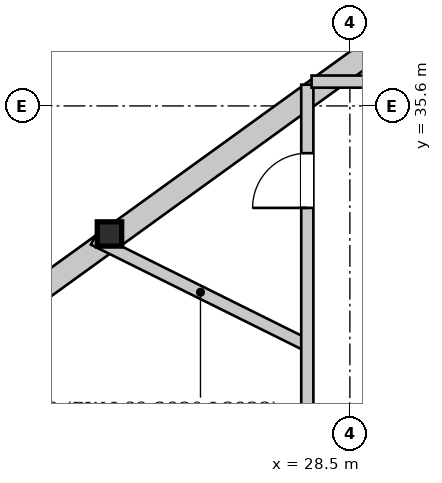
"""IFC4 building model, lengths in metres.
Left out: names, types, materials, properties, quantities, classifications, styles, units other than length and angle.
Written with IfcOpenShell. Run it as: python <this file> out.ifc"""

import sys

from ifc_helpers import new_model, si_unit, direction, frame, frame_2d, origin, origin_2d, place, context, subcontext, project, spatial, rectangle, i_section, extrude, source, transform, mapped, element, fill, save


model = new_model("IFC4")
c1 = context("Model", 3, precision=1e-05, world=origin(), true_north=direction((0.0, 1.0)))
c2 = subcontext(c1, "Body", "Model", "MODEL_VIEW")
j1 = project(units=[si_unit("LENGTHUNIT", "METRE"), si_unit("PLANEANGLEUNIT", "RADIAN")], contexts=[c1])
p1 = place(None, origin())
s1 = spatial("IfcSite", under=j1, at=p1, CompositionType="ELEMENT")
p2 = place(p1, origin())
s2 = spatial("IfcBuilding", under=s1, at=p2, CompositionType="ELEMENT")
p3 = place(p2, frame((0.0, 0.0, 259.7)))
s3 = spatial("IfcBuildingStorey", under=s2, at=p3, CompositionType="ELEMENT", Elevation=259.7)
m1 = source(origin(), c2, "Body", "SweptSolid", [
    extrude(i_section(OverallWidth=0.401, OverallDepth=0.399, WebThickness=0.022, FlangeThickness=0.034, at=origin_2d()), origin(), (0.0, 0.0, 1.0), 3.449),
])
p4 = place(p3, frame((24.567, 33.648, 0.0), z_axis=(-0.011892015434, -0.089048544142, 0.995956292593), x_axis=(0.991200353679, -0.13237015852, 0.0)))
e1 = element("IfcColumn", 1, at=p4, inside=s3, PredefinedType="COLUMN", context=c2, shape_type="MappedRepresentation", body=[
    mapped(m1, transform((0.0, 0.0, 0.0), x_axis=(1.0, 0.0, 0.0), y_axis=(0.0, 1.0, 0.0), z_axis=(0.0, 0.0, 1.0), scale=1.0)),
])
p5 = place(p3, frame((15.819, 27.087, 0.0), z_axis=(0.0, 0.0, 1.0), x_axis=(0.810286001924, 0.586034636421, 0.0)))
e2 = element("IfcWall", 2, at=p5, inside=s3, PredefinedType="SOLIDWALL", context=c2, shape_type="SweptSolid", body=[
    extrude(rectangle(XDim=21.866, YDim=0.38, at=frame_2d((10.933, 0.0))), origin(), (0.0, 0.0, 1.0), 2.872),
])
p6 = place(p5, frame((5.023, 0.0, 0.502)))
e3 = element("IfcOpeningElement", 3, at=p6, cuts=e2, PredefinedType="OPENING", context=c2, shape_type="SweptSolid", body=[
    extrude(rectangle(XDim=2.2, YDim=2.25, at=frame_2d((1.1, 1.125))), frame((0.0, 0.2, 0.0), z_axis=(0.0, -1.0, 0.0), x_axis=(1.0, 0.0, 0.0)), (0.0, 0.0, 1.0), 0.4),
])
p7 = place(p5, frame((16.244, 0.0, 0.502)))
e4 = element("IfcOpeningElement", 4, at=p7, cuts=e2, PredefinedType="OPENING", context=c2, shape_type="SweptSolid", body=[
    extrude(rectangle(XDim=2.2, YDim=2.25, at=frame_2d((1.1, 1.125))), frame((0.0, 0.2, 0.0), z_axis=(0.0, -1.0, 0.0), x_axis=(1.0, 0.0, 0.0)), (0.0, 0.0, 1.0), 0.4),
])
p8 = place(p3, frame((27.8, 31.663, 0.0), z_axis=(0.0, 0.0, 1.0), x_axis=(-0.895717798703, 0.444623014571, 0.0)))
e5 = element("IfcWall", 5, at=p8, inside=s3, PredefinedType="PARTITIONING", context=c2, shape_type="SweptSolid", body=[
    extrude(rectangle(XDim=3.923, YDim=0.2, at=frame_2d((1.962, 0.0))), origin(), (0.0, 0.0, 1.0), 3.38),
])
p9 = place(p3, frame((27.8, 17.2, 0.0), z_axis=(0.0, 0.0, 1.0), x_axis=(0.0, 1.0, 0.0)))
e6 = element("IfcWall", 6, at=p9, inside=s3, PredefinedType="PARTITIONING", context=c2, shape_type="SweptSolid", body=[
    extrude(rectangle(XDim=18.749, YDim=0.2, at=frame_2d((9.375, 0.0))), origin(), (0.0, 0.0, 1.0), 3.38),
])
p10 = place(p9, frame((16.723, 0.0, 0.0)))
e7 = element("IfcOpeningElement", 7, at=p10, cuts=e6, PredefinedType="OPENING", context=c2, shape_type="SweptSolid", body=[
    extrude(rectangle(XDim=0.9, YDim=2.1, at=frame_2d((0.45, 1.05))), frame((0.0, 0.11, 0.0), z_axis=(0.0, -1.0, 0.0), x_axis=(1.0, 0.0, 0.0)), (0.0, 0.0, 1.0), 0.22),
])
p11 = place(p3, frame((27.87, 36.0, 0.0), z_axis=(0.0, 0.0, 1.0), x_axis=(1.0, 0.0, 0.0)))
e8 = element("IfcWall", 8, at=p11, inside=s3, PredefinedType="PARTITIONING", context=c2, shape_type="SweptSolid", body=[
    extrude(rectangle(XDim=13.13, YDim=0.2, at=frame_2d((6.565, 0.0))), origin(), (0.0, 0.0, 1.0), 3.38),
])
m2 = source(origin(), c2, "Body", "SweptSolid", [
    extrude(rectangle(XDim=0.9, YDim=2.1, at=frame_2d((0.45, 1.05))), frame((0.0, 0.025, 0.0), z_axis=(0.0, -1.0, 0.0), x_axis=(1.0, 0.0, 0.0)), (0.0, 0.0, 1.0), 0.05),
])
p12 = place(p10, origin())
e9 = element("IfcDoor", 9, at=p12, inside=s3, OperationType="SINGLE_SWING_LEFT", PredefinedType="DOOR", context=c2, shape_type="MappedRepresentation", body=[
    mapped(m2, transform((0.0, 0.0, 0.0), x_axis=(1.0, 0.0, 0.0), y_axis=(0.0, 1.0, 0.0), z_axis=(0.0, 0.0, 1.0), scale=1.0)),
])
fill(e7, e9)
save(model, sys.argv[1])
